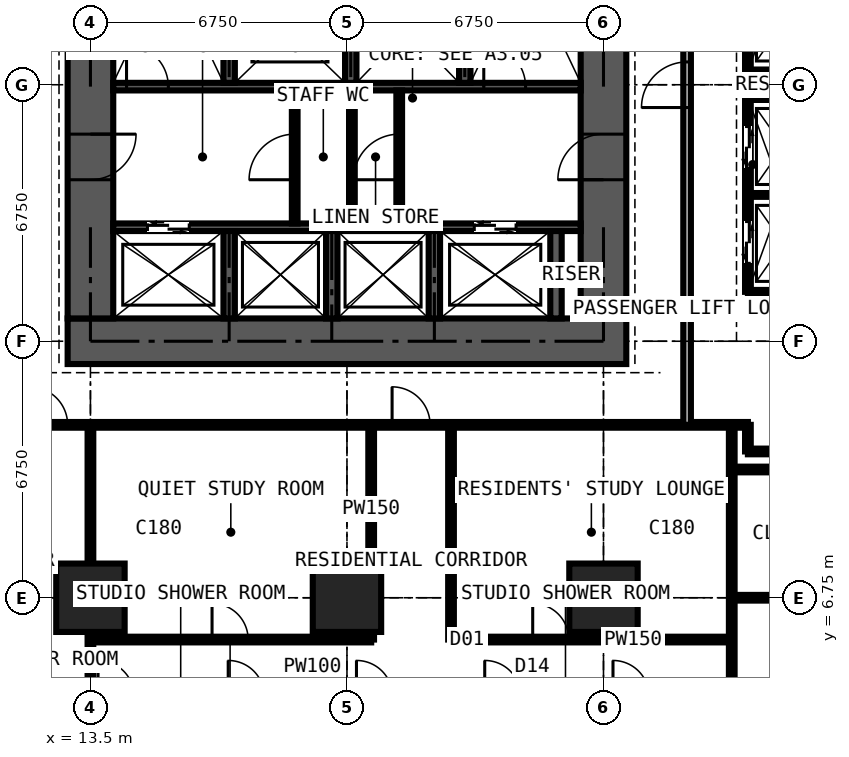
"""IFC4 building model, lengths in metres.
Left out: names, types, materials, properties, quantities, classifications, styles, units other than length and angle.
Written with IfcOpenShell. Run it as: python <this file> out.ifc"""

import sys

from ifc_helpers import new_model, si_unit, direction, frame, frame_2d, origin, origin_2d, place, context, subcontext, project, spatial, rectangle, extrude, element, fill, save


model = new_model("IFC4")
c1 = context("Model", 3, precision=1e-05, world=origin(), true_north=direction((0.0, 1.0)))
c2 = subcontext(c1, "Body", "Model", "MODEL_VIEW")
j1 = project(units=[si_unit("LENGTHUNIT", "METRE"), si_unit("PLANEANGLEUNIT", "RADIAN")], contexts=[c1])
p1 = place(None, origin())
s1 = spatial("IfcSite", under=j1, at=p1, CompositionType="ELEMENT")
p2 = place(p1, origin())
s2 = spatial("IfcBuilding", under=s1, at=p2, CompositionType="ELEMENT")
p3 = place(p2, frame((0.0, 0.0, 105.3)))
s3 = spatial("IfcBuildingStorey", under=s2, at=p3, CompositionType="ELEMENT", Elevation=105.3)
for number, where, z_axis, x_axis in (
    (1, (13.5, 6.75, 0.0), (0.0, 0.0, 1.0), (1.0, 0.0, 0.0)),
    (2, (20.25, 6.75, 0.0), (0.0, 0.0, 1.0), (1.0, 0.0, 0.0)),
    (3, (27.0, 6.75, 0.0), (0.0, 0.0, 1.0), (1.0, 0.0, 0.0)),
):
    element("IfcColumn", number, at=place(p3, frame(where, z_axis=z_axis, x_axis=x_axis)), inside=s3, PredefinedType="COLUMN", context=c2, shape_type="SweptSolid", body=[
        extrude(rectangle(XDim=1.8, YDim=1.8, at=origin_2d()), origin(), (0.0, 0.0, 1.0), 3.6),
    ])
p4 = place(p3, frame((12.9, 13.5, 0.0), z_axis=(0.0, 0.0, 1.0), x_axis=(1.0, 0.0, 0.0)))
e4 = element("IfcWall", 4, at=p4, inside=s3, PredefinedType="SHEAR", context=c2, shape_type="SweptSolid", body=[
    extrude(rectangle(XDim=14.7, YDim=1.2, at=frame_2d((7.35, 0.0))), origin(), (0.0, 0.0, 1.0), 3.6),
])
p5 = place(p3, frame((27.0, 14.1, 0.0), z_axis=(0.0, 0.0, 1.0), x_axis=(0.0, 1.0, 0.0)))
e5 = element("IfcWall", 5, at=p5, inside=s3, PredefinedType="SHEAR", context=c2, shape_type="SweptSolid", body=[
    extrude(rectangle(XDim=12.3, YDim=1.2, at=frame_2d((6.15, 0.0))), origin(), (0.0, 0.0, 1.0), 3.6),
])
p6 = place(p5, frame((3.65, 0.0, 0.0)))
e6 = element("IfcOpeningElement", 6, at=p6, cuts=e5, PredefinedType="OPENING", context=c2, shape_type="SweptSolid", body=[
    extrude(rectangle(XDim=1.2, YDim=2.2, at=frame_2d((0.6, 1.1))), frame((0.0, 0.61, 0.0), z_axis=(0.0, -1.0, 0.0), x_axis=(1.0, 0.0, 0.0)), (0.0, 0.0, 1.0), 1.22),
])
p7 = place(p3, frame((13.5, 26.4, 0.0), z_axis=(0.0, 0.0, 1.0), x_axis=(0.0, -1.0, 0.0)))
e7 = element("IfcWall", 7, at=p7, inside=s3, PredefinedType="SHEAR", context=c2, shape_type="SweptSolid", body=[
    extrude(rectangle(XDim=12.3, YDim=1.2, at=frame_2d((6.15, 0.0))), origin(), (0.0, 0.0, 1.0), 3.6),
])
p8 = place(p7, frame((7.45, 0.0, 0.0)))
e8 = element("IfcOpeningElement", 8, at=p8, cuts=e7, PredefinedType="OPENING", context=c2, shape_type="SweptSolid", body=[
    extrude(rectangle(XDim=1.2, YDim=2.2, at=frame_2d((0.6, 1.1))), frame((0.0, 0.61, 0.0), z_axis=(0.0, -1.0, 0.0), x_axis=(1.0, 0.0, 0.0)), (0.0, 0.0, 1.0), 1.22),
])
p9 = place(p3, frame((14.1, 16.5, 0.0), z_axis=(0.0, 0.0, 1.0), x_axis=(1.0, 0.0, 0.0)))
e9 = element("IfcWall", 9, at=p9, inside=s3, PredefinedType="SHEAR", context=c2, shape_type="SweptSolid", body=[
    extrude(rectangle(XDim=12.3, YDim=0.2, at=frame_2d((6.15, 0.0))), origin(), (0.0, 0.0, 1.0), 3.6),
])
p10 = place(p9, frame((0.9, 0.0, 0.0)))
e10 = element("IfcOpeningElement", 10, at=p10, cuts=e9, PredefinedType="OPENING", context=c2, shape_type="SweptSolid", body=[
    extrude(rectangle(XDim=1.1, YDim=2.2, at=frame_2d((0.55, 1.1))), frame((0.0, 0.11, 0.0), z_axis=(0.0, -1.0, 0.0), x_axis=(1.0, 0.0, 0.0)), (0.0, 0.0, 1.0), 0.22),
])
p11 = place(p9, frame((9.5, 0.0, 0.0)))
e11 = element("IfcOpeningElement", 11, at=p11, cuts=e9, PredefinedType="OPENING", context=c2, shape_type="SweptSolid", body=[
    extrude(rectangle(XDim=1.1, YDim=2.2, at=frame_2d((0.55, 1.1))), frame((0.0, 0.11, 0.0), z_axis=(0.0, -1.0, 0.0), x_axis=(1.0, 0.0, 0.0)), (0.0, 0.0, 1.0), 0.22),
])
p12 = place(p3, frame((14.1, 20.2, 0.0), z_axis=(0.0, 0.0, 1.0), x_axis=(1.0, 0.0, 0.0)))
e12 = element("IfcWall", 12, at=p12, inside=s3, PredefinedType="SHEAR", context=c2, shape_type="SweptSolid", body=[
    extrude(rectangle(XDim=12.3, YDim=0.2, at=frame_2d((6.15, 0.0))), origin(), (0.0, 0.0, 1.0), 3.6),
])
p13 = place(p12, frame((0.35, 0.0, 0.0)))
e13 = element("IfcOpeningElement", 13, at=p13, cuts=e12, PredefinedType="OPENING", context=c2, shape_type="SweptSolid", body=[
    extrude(rectangle(XDim=1.1, YDim=2.2, at=frame_2d((0.55, 1.1))), frame((0.0, 0.11, 0.0), z_axis=(0.0, -1.0, 0.0), x_axis=(1.0, 0.0, 0.0)), (0.0, 0.0, 1.0), 0.22),
])
p14 = place(p12, frame((9.75, 0.0, 0.0)))
e14 = element("IfcOpeningElement", 14, at=p14, cuts=e12, PredefinedType="OPENING", context=c2, shape_type="SweptSolid", body=[
    extrude(rectangle(XDim=1.1, YDim=2.2, at=frame_2d((0.55, 1.1))), frame((0.0, 0.11, 0.0), z_axis=(0.0, -1.0, 0.0), x_axis=(1.0, 0.0, 0.0)), (0.0, 0.0, 1.0), 0.22),
])
for number, where, z_axis, x_axis in (
    (15, (17.15, 20.3, 0.0), (0.0, 0.0, 1.0), (0.0, 1.0, 0.0)),
    (16, (23.35, 20.3, 0.0), (0.0, 0.0, 1.0), (0.0, 1.0, 0.0)),
):
    element("IfcWall", number, at=place(p3, frame(where, z_axis=z_axis, x_axis=x_axis)), inside=s3, PredefinedType="SHEAR", context=c2, shape_type="SweptSolid", body=[
        extrude(rectangle(XDim=6.1, YDim=0.3, at=frame_2d((3.05, 0.0))), origin(), (0.0, 0.0, 1.0), 3.6),
    ])
p15 = place(p3, frame((20.35, 20.3, 0.0), z_axis=(0.0, 0.0, 1.0), x_axis=(0.0, 1.0, 0.0)))
e17 = element("IfcWall", 17, at=p15, inside=s3, PredefinedType="SHEAR", context=c2, shape_type="SweptSolid", body=[
    extrude(rectangle(XDim=2.8, YDim=0.3, at=frame_2d((1.4, 0.0))), origin(), (0.0, 0.0, 1.0), 3.6),
])
for number, where, z_axis, x_axis in (
    (18, (17.15, 14.1, 0.0), (0.0, 0.0, 1.0), (0.0, 1.0, 0.0)),
    (19, (19.85, 14.1, 0.0), (0.0, 0.0, 1.0), (0.0, 1.0, 0.0)),
    (20, (22.55, 14.1, 0.0), (0.0, 0.0, 1.0), (0.0, 1.0, 0.0)),
    (21, (25.75, 14.1, 0.0), (0.0, 0.0, 1.0), (0.0, 1.0, 0.0)),
):
    element("IfcWall", number, at=place(p3, frame(where, z_axis=z_axis, x_axis=x_axis)), inside=s3, PredefinedType="SHEAR", context=c2, shape_type="SweptSolid", body=[
        extrude(rectangle(XDim=2.3, YDim=0.3, at=frame_2d((1.15, 0.0))), origin(), (0.0, 0.0, 1.0), 3.6),
    ])
p16 = place(p3, frame((18.875, 16.6, 0.0), z_axis=(0.0, 0.0, 1.0), x_axis=(0.0, 1.0, 0.0)))
e22 = element("IfcWall", 22, at=p16, inside=s3, PredefinedType="PARTITIONING", context=c2, shape_type="SweptSolid", body=[
    extrude(rectangle(XDim=3.5, YDim=0.15, at=frame_2d((1.75, 0.0))), origin(), (0.0, 0.0, 1.0), 3.375),
])
p17 = place(p16, frame((1.15, 0.0, 0.0)))
e23 = element("IfcOpeningElement", 23, at=p17, cuts=e22, PredefinedType="OPENING", context=c2, shape_type="SweptSolid", body=[
    extrude(rectangle(XDim=1.2, YDim=2.2, at=frame_2d((0.6, 1.1))), frame((0.0, 0.085, 0.0), z_axis=(0.0, -1.0, 0.0), x_axis=(1.0, 0.0, 0.0)), (0.0, 0.0, 1.0), 0.17),
])
p18 = place(p3, frame((21.625, 16.6, 0.0), z_axis=(0.0, 0.0, 1.0), x_axis=(0.0, 1.0, 0.0)))
e24 = element("IfcWall", 24, at=p18, inside=s3, PredefinedType="PARTITIONING", context=c2, shape_type="SweptSolid", body=[
    extrude(rectangle(XDim=3.5, YDim=0.15, at=frame_2d((1.75, 0.0))), origin(), (0.0, 0.0, 1.0), 3.375),
])
p19 = place(p18, frame((1.15, 0.0, 0.0)))
e25 = element("IfcOpeningElement", 25, at=p19, cuts=e24, PredefinedType="OPENING", context=c2, shape_type="SweptSolid", body=[
    extrude(rectangle(XDim=1.2, YDim=2.2, at=frame_2d((0.6, 1.1))), frame((0.0, 0.085, 0.0), z_axis=(0.0, -1.0, 0.0), x_axis=(1.0, 0.0, 0.0)), (0.0, 0.0, 1.0), 0.17),
])
p20 = place(p3, frame((20.38, 16.6, 0.0), z_axis=(0.0, 0.0, 1.0), x_axis=(0.0, 1.0, 0.0)))
e26 = element("IfcWall", 26, at=p20, inside=s3, PredefinedType="PARTITIONING", context=c2, shape_type="SweptSolid", body=[
    extrude(rectangle(XDim=3.5, YDim=0.15, at=frame_2d((1.75, 0.0))), origin(), (0.0, 0.0, 1.0), 3.375),
])
p21 = place(p3, frame((10.125, 11.3, 0.0), z_axis=(0.0, 0.0, 1.0), x_axis=(1.0, 0.0, 0.0)))
e27 = element("IfcWall", 27, at=p21, inside=s3, PredefinedType="PARTITIONING", context=c2, shape_type="SweptSolid", body=[
    extrude(rectangle(XDim=20.675, YDim=0.15, at=frame_2d((10.337, 0.0))), origin(), (0.0, 0.0, 1.0), 3.375),
])
p22 = place(p21, frame((1.775, 0.0, 0.0)))
e28 = element("IfcOpeningElement", 28, at=p22, cuts=e27, PredefinedType="OPENING", context=c2, shape_type="SweptSolid", body=[
    extrude(rectangle(XDim=1.0, YDim=2.2, at=frame_2d((0.5, 1.1))), frame((0.0, 0.085, 0.0), z_axis=(0.0, -1.0, 0.0), x_axis=(1.0, 0.0, 0.0)), (0.0, 0.0, 1.0), 0.17),
])
p23 = place(p21, frame((11.312, 0.0, 0.0)))
e29 = element("IfcOpeningElement", 29, at=p23, cuts=e27, PredefinedType="OPENING", context=c2, shape_type="SweptSolid", body=[
    extrude(rectangle(XDim=1.0, YDim=2.2, at=frame_2d((0.5, 1.1))), frame((0.0, 0.085, 0.0), z_axis=(0.0, -1.0, 0.0), x_axis=(1.0, 0.0, 0.0)), (0.0, 0.0, 1.0), 0.17),
])
p24 = place(p3, frame((13.5, -0.734, 0.0), z_axis=(0.0, 0.0, 1.0), x_axis=(0.0, 1.0, 0.0)))
e30 = element("IfcWall", 30, at=p24, inside=s3, PredefinedType="PARTITIONING", context=c2, shape_type="SweptSolid", body=[
    extrude(rectangle(XDim=12.034, YDim=0.15, at=frame_2d((6.017, 0.0))), origin(), (0.0, 0.0, 1.0), 2.61),
])
p25 = place(p3, frame((13.5, 5.65, 0.0), z_axis=(0.0, 0.0, 1.0), x_axis=(1.0, 0.0, 0.0)))
e31 = element("IfcWall", 31, at=p25, inside=s3, PredefinedType="PARTITIONING", context=c2, shape_type="SweptSolid", body=[
    extrude(rectangle(XDim=7.387, YDim=0.15, at=frame_2d((3.694, 0.0))), origin(), (0.0, 0.0, 1.0), 3.375),
])
p26 = place(p25, frame((3.2, 0.0, 0.0)))
e32 = element("IfcOpeningElement", 32, at=p26, cuts=e31, PredefinedType="OPENING", context=c2, shape_type="SweptSolid", body=[
    extrude(rectangle(XDim=0.95, YDim=2.2, at=frame_2d((0.475, 1.1))), frame((0.0, 0.085, 0.0), z_axis=(0.0, -1.0, 0.0), x_axis=(1.0, 0.0, 0.0)), (0.0, 0.0, 1.0), 0.17),
])
p27 = place(p3, frame((20.887, 5.65, 0.0), z_axis=(0.0, 0.0, 1.0), x_axis=(0.0, 1.0, 0.0)))
e33 = element("IfcWall", 33, at=p27, inside=s3, PredefinedType="PARTITIONING", context=c2, shape_type="SweptSolid", body=[
    extrude(rectangle(XDim=5.65, YDim=0.15, at=frame_2d((2.825, 0.0))), origin(), (0.0, 0.0, 1.0), 3.375),
])
p28 = place(p3, frame((22.988, 5.65, 0.0), z_axis=(0.0, 0.0, 1.0), x_axis=(1.0, 0.0, 0.0)))
e34 = element("IfcWall", 34, at=p28, inside=s3, PredefinedType="PARTITIONING", context=c2, shape_type="SweptSolid", body=[
    extrude(rectangle(XDim=7.387, YDim=0.15, at=frame_2d((3.694, 0.0))), origin(), (0.0, 0.0, 1.0), 3.375),
])
p29 = place(p28, frame((2.15, 0.0, 0.0)))
e35 = element("IfcOpeningElement", 35, at=p29, cuts=e34, PredefinedType="OPENING", context=c2, shape_type="SweptSolid", body=[
    extrude(rectangle(XDim=0.95, YDim=2.2, at=frame_2d((0.475, 1.1))), frame((0.0, 0.085, 0.0), z_axis=(0.0, -1.0, 0.0), x_axis=(1.0, 0.0, 0.0)), (0.0, 0.0, 1.0), 0.17),
])
p30 = place(p3, frame((22.988, 5.65, 0.0), z_axis=(0.0, 0.0, 1.0), x_axis=(0.0, 1.0, 0.0)))
e36 = element("IfcWall", 36, at=p30, inside=s3, PredefinedType="PARTITIONING", context=c2, shape_type="SweptSolid", body=[
    extrude(rectangle(XDim=5.65, YDim=0.15, at=frame_2d((2.825, 0.0))), origin(), (0.0, 0.0, 1.0), 3.375),
])
p31 = place(p3, frame((29.2, 11.3, 0.0), z_axis=(0.0, 0.0, 1.0), x_axis=(0.0, 1.0, 0.0)))
e37 = element("IfcWall", 37, at=p31, inside=s3, PredefinedType="PARTITIONING", context=c2, shape_type="SweptSolid", body=[
    extrude(rectangle(XDim=17.9, YDim=0.2, at=frame_2d((8.95, 0.0))), origin(), (0.0, 0.0, 1.0), 3.375),
])
p32 = place(p31, frame((8.35, 0.0, 0.0)))
e38 = element("IfcOpeningElement", 38, at=p32, cuts=e37, PredefinedType="OPENING", context=c2, shape_type="SweptSolid", body=[
    extrude(rectangle(XDim=1.2, YDim=2.2, at=frame_2d((0.6, 1.1))), frame((0.0, 0.11, 0.0), z_axis=(0.0, -1.0, 0.0), x_axis=(1.0, 0.0, 0.0)), (0.0, 0.0, 1.0), 0.22),
])
p33 = place(p3, frame((30.375, -0.734, 0.0), z_axis=(0.0, 0.0, 1.0), x_axis=(0.0, 1.0, 0.0)))
e39 = element("IfcWall", 39, at=p33, inside=s3, PredefinedType="PARTITIONING", context=c2, shape_type="SweptSolid", body=[
    extrude(rectangle(XDim=12.034, YDim=0.15, at=frame_2d((6.017, 0.0))), origin(), (0.0, 0.0, 1.0), 3.375),
])
p34 = place(p3, frame((30.375, 6.75, 0.0), z_axis=(0.0, 0.0, 1.0), x_axis=(1.0, 0.0, 0.0)))
e40 = element("IfcWall", 40, at=p34, inside=s3, PredefinedType="PARTITIONING", context=c2, shape_type="SweptSolid", body=[
    extrude(rectangle(XDim=10.859, YDim=0.15, at=frame_2d((5.429, 0.0))), origin(), (0.0, 0.0, 1.0), 2.877),
])
p35 = place(p34, frame((1.45, 0.0, 0.0)))
e41 = element("IfcOpeningElement", 41, at=p35, cuts=e40, PredefinedType="OPENING", context=c2, shape_type="SweptSolid", body=[
    extrude(rectangle(XDim=1.0, YDim=2.2, at=frame_2d((0.5, 1.1))), frame((0.0, 0.085, 0.0), z_axis=(0.0, -1.0, 0.0), x_axis=(1.0, 0.0, 0.0)), (0.0, 0.0, 1.0), 0.17),
])
p36 = place(p3, frame((30.375, 10.125, 0.0), z_axis=(0.0, 0.0, 1.0), x_axis=(1.0, 0.0, 0.0)))
e42 = element("IfcWall", 42, at=p36, inside=s3, PredefinedType="PARTITIONING", context=c2, shape_type="SweptSolid", body=[
    extrude(rectangle(XDim=10.859, YDim=0.15, at=frame_2d((5.429, 0.0))), origin(), (0.0, 0.0, 1.0), 3.375),
])
p37 = place(p36, frame((2.5, 0.0, 0.0)))
e43 = element("IfcOpeningElement", 43, at=p37, cuts=e42, PredefinedType="OPENING", context=c2, shape_type="SweptSolid", body=[
    extrude(rectangle(XDim=1.0, YDim=2.2, at=frame_2d((0.5, 1.1))), frame((0.0, 0.085, 0.0), z_axis=(0.0, -1.0, 0.0), x_axis=(1.0, 0.0, 0.0)), (0.0, 0.0, 1.0), 0.17),
])
p38 = place(p3, frame((30.8, 10.6, 0.0), z_axis=(0.0, 0.0, 1.0), x_axis=(0.0, 1.0, 0.0)))
e44 = element("IfcWall", 44, at=p38, inside=s3, PredefinedType="PARTITIONING", context=c2, shape_type="SweptSolid", body=[
    extrude(rectangle(XDim=0.7, YDim=0.15, at=frame_2d((0.35, 0.0))), origin(), (0.0, 0.0, 1.0), 3.375),
])
p39 = place(p3, frame((30.8, 10.6, 0.0), z_axis=(0.0, 0.0, 1.0), x_axis=(1.0, 0.0, 0.0)))
e45 = element("IfcWall", 45, at=p39, inside=s3, PredefinedType="PARTITIONING", context=c2, shape_type="SweptSolid", body=[
    extrude(rectangle(XDim=1.85, YDim=0.15, at=frame_2d((0.925, 0.0))), origin(), (0.0, 0.0, 1.0), 3.375),
])
p40 = place(p3, frame((30.8, 14.8, 0.0), z_axis=(0.0, 0.0, 1.0), x_axis=(0.0, 1.0, 0.0)))
e46 = element("IfcWall", 46, at=p40, inside=s3, PredefinedType="PARTITIONING", context=c2, shape_type="SweptSolid", body=[
    extrude(rectangle(XDim=10.9, YDim=0.15, at=frame_2d((5.45, 0.0))), origin(), (0.0, 0.0, 1.0), 3.375),
])
p41 = place(p40, frame((0.75, 0.0, 0.0)))
e47 = element("IfcOpeningElement", 47, at=p41, cuts=e46, PredefinedType="OPENING", context=c2, shape_type="SweptSolid", body=[
    extrude(rectangle(XDim=1.1, YDim=2.2, at=frame_2d((0.55, 1.1))), frame((0.0, 0.085, 0.0), z_axis=(0.0, -1.0, 0.0), x_axis=(1.0, 0.0, 0.0)), (0.0, 0.0, 1.0), 0.17),
])
p42 = place(p40, frame((3.25, 0.0, 0.0)))
e48 = element("IfcOpeningElement", 48, at=p42, cuts=e46, PredefinedType="OPENING", context=c2, shape_type="SweptSolid", body=[
    extrude(rectangle(XDim=1.1, YDim=2.2, at=frame_2d((0.55, 1.1))), frame((0.0, 0.085, 0.0), z_axis=(0.0, -1.0, 0.0), x_axis=(1.0, 0.0, 0.0)), (0.0, 0.0, 1.0), 0.17),
])
p43 = place(p40, frame((6.5, 0.0, 0.0)))
e49 = element("IfcOpeningElement", 49, at=p43, cuts=e46, PredefinedType="OPENING", context=c2, shape_type="SweptSolid", body=[
    extrude(rectangle(XDim=1.1, YDim=2.2, at=frame_2d((0.55, 1.1))), frame((0.0, 0.085, 0.0), z_axis=(0.0, -1.0, 0.0), x_axis=(1.0, 0.0, 0.0)), (0.0, 0.0, 1.0), 0.17),
])
p44 = place(p40, frame((9.05, 0.0, 0.0)))
e50 = element("IfcOpeningElement", 50, at=p44, cuts=e46, PredefinedType="OPENING", context=c2, shape_type="SweptSolid", body=[
    extrude(rectangle(XDim=1.1, YDim=2.2, at=frame_2d((0.55, 1.1))), frame((0.0, 0.085, 0.0), z_axis=(0.0, -1.0, 0.0), x_axis=(1.0, 0.0, 0.0)), (0.0, 0.0, 1.0), 0.17),
])
for number, where, z_axis, x_axis in (
    (51, (30.8, 14.8, 0.0), (0.0, 0.0, 1.0), (1.0, 0.0, 0.0)),
    (52, (30.8, 17.35, 0.0), (0.0, 0.0, 1.0), (1.0, 0.0, 0.0)),
    (53, (30.8, 19.9, 0.0), (0.0, 0.0, 1.0), (1.0, 0.0, 0.0)),
    (54, (30.8, 20.6, 0.0), (0.0, 0.0, 1.0), (1.0, 0.0, 0.0)),
):
    element("IfcWall", number, at=place(p3, frame(where, z_axis=z_axis, x_axis=x_axis)), inside=s3, PredefinedType="SHEAR", context=c2, shape_type="SweptSolid", body=[
        extrude(rectangle(XDim=1.85, YDim=0.1, at=frame_2d((0.925, 0.0))), origin(), (0.0, 0.0, 1.0), 3.375),
    ])
p45 = place(p10, origin())
e55 = element("IfcDoor", 55, at=p45, inside=s3, OperationType="DOUBLE_DOOR_SLIDING", PredefinedType="DOOR", context=c2, shape_type="SweptSolid", body=[
    extrude(rectangle(XDim=1.1, YDim=2.2, at=frame_2d((0.55, 1.1))), frame((0.0, 0.025, 0.0), z_axis=(0.0, -1.0, 0.0), x_axis=(1.0, 0.0, 0.0)), (0.0, 0.0, 1.0), 0.05),
])
fill(e10, e55)
p46 = place(p11, origin())
e56 = element("IfcDoor", 56, at=p46, inside=s3, OperationType="DOUBLE_DOOR_SLIDING", PredefinedType="DOOR", context=c2, shape_type="SweptSolid", body=[
    extrude(rectangle(XDim=1.1, YDim=2.2, at=frame_2d((0.55, 1.1))), frame((0.0, 0.025, 0.0), z_axis=(0.0, -1.0, 0.0), x_axis=(1.0, 0.0, 0.0)), (0.0, 0.0, 1.0), 0.05),
])
fill(e11, e56)
p47 = place(p8, origin())
e57 = element("IfcDoor", 57, at=p47, inside=s3, OperationType="DOUBLE_DOOR_SINGLE_SWING", PredefinedType="DOOR", context=c2, shape_type="SweptSolid", body=[
    extrude(rectangle(XDim=1.2, YDim=2.2, at=frame_2d((0.6, 1.1))), frame((0.0, 0.025, 0.0), z_axis=(0.0, -1.0, 0.0), x_axis=(1.0, 0.0, 0.0)), (0.0, 0.0, 1.0), 0.05),
])
fill(e8, e57)
p48 = place(p6, origin())
e58 = element("IfcDoor", 58, at=p48, inside=s3, OperationType="DOUBLE_DOOR_SINGLE_SWING", PredefinedType="DOOR", context=c2, shape_type="SweptSolid", body=[
    extrude(rectangle(XDim=1.2, YDim=2.2, at=frame_2d((0.6, 1.1))), frame((0.0, 0.025, 0.0), z_axis=(0.0, -1.0, 0.0), x_axis=(1.0, 0.0, 0.0)), (0.0, 0.0, 1.0), 0.05),
])
fill(e6, e58)
p49 = place(p17, origin())
e59 = element("IfcDoor", 59, at=p49, inside=s3, OperationType="DOUBLE_DOOR_SINGLE_SWING", PredefinedType="DOOR", context=c2, shape_type="SweptSolid", body=[
    extrude(rectangle(XDim=1.2, YDim=2.2, at=frame_2d((0.6, 1.1))), frame((0.0, 0.025, 0.0), z_axis=(0.0, -1.0, 0.0), x_axis=(1.0, 0.0, 0.0)), (0.0, 0.0, 1.0), 0.05),
])
fill(e23, e59)
p50 = place(p19, origin())
e60 = element("IfcDoor", 60, at=p50, inside=s3, OperationType="DOUBLE_DOOR_SINGLE_SWING", PredefinedType="DOOR", context=c2, shape_type="SweptSolid", body=[
    extrude(rectangle(XDim=1.2, YDim=2.2, at=frame_2d((0.6, 1.1))), frame((0.0, 0.025, 0.0), z_axis=(0.0, -1.0, 0.0), x_axis=(1.0, 0.0, 0.0)), (0.0, 0.0, 1.0), 0.05),
])
fill(e25, e60)
p51 = place(p13, origin())
e61 = element("IfcDoor", 61, at=p51, inside=s3, OperationType="SINGLE_SWING_LEFT", PredefinedType="DOOR", context=c2, shape_type="SweptSolid", body=[
    extrude(rectangle(XDim=1.1, YDim=2.2, at=frame_2d((0.55, 1.1))), frame((0.0, 0.025, 0.0), z_axis=(0.0, -1.0, 0.0), x_axis=(1.0, 0.0, 0.0)), (0.0, 0.0, 1.0), 0.05),
])
fill(e13, e61)
p52 = place(p14, origin())
e62 = element("IfcDoor", 62, at=p52, inside=s3, OperationType="SINGLE_SWING_LEFT", PredefinedType="DOOR", context=c2, shape_type="SweptSolid", body=[
    extrude(rectangle(XDim=1.1, YDim=2.2, at=frame_2d((0.55, 1.1))), frame((0.0, 0.025, 0.0), z_axis=(0.0, -1.0, 0.0), x_axis=(1.0, 0.0, 0.0)), (0.0, 0.0, 1.0), 0.05),
])
fill(e14, e62)
p53 = place(p22, origin())
e63 = element("IfcDoor", 63, at=p53, inside=s3, OperationType="SINGLE_SWING_LEFT", PredefinedType="DOOR", context=c2, shape_type="SweptSolid", body=[
    extrude(rectangle(XDim=1.0, YDim=2.2, at=frame_2d((0.5, 1.1))), frame((0.0, 0.025, 0.0), z_axis=(0.0, -1.0, 0.0), x_axis=(1.0, 0.0, 0.0)), (0.0, 0.0, 1.0), 0.05),
])
fill(e28, e63)
p54 = place(p23, origin())
e64 = element("IfcDoor", 64, at=p54, inside=s3, OperationType="SINGLE_SWING_LEFT", PredefinedType="DOOR", context=c2, shape_type="SweptSolid", body=[
    extrude(rectangle(XDim=1.0, YDim=2.2, at=frame_2d((0.5, 1.1))), frame((0.0, 0.025, 0.0), z_axis=(0.0, -1.0, 0.0), x_axis=(1.0, 0.0, 0.0)), (0.0, 0.0, 1.0), 0.05),
])
fill(e29, e64)
p55 = place(p29, origin())
e65 = element("IfcDoor", 65, at=p55, inside=s3, OperationType="SINGLE_SWING_LEFT", PredefinedType="DOOR", context=c2, shape_type="SweptSolid", body=[
    extrude(rectangle(XDim=0.95, YDim=2.2, at=frame_2d((0.475, 1.1))), frame((0.0, 0.025, 0.0), z_axis=(0.0, -1.0, 0.0), x_axis=(1.0, 0.0, 0.0)), (0.0, 0.0, 1.0), 0.05),
])
fill(e35, e65)
p56 = place(p26, origin())
e66 = element("IfcDoor", 66, at=p56, inside=s3, OperationType="SINGLE_SWING_LEFT", PredefinedType="DOOR", context=c2, shape_type="SweptSolid", body=[
    extrude(rectangle(XDim=0.95, YDim=2.2, at=frame_2d((0.475, 1.1))), frame((0.0, 0.025, 0.0), z_axis=(0.0, -1.0, 0.0), x_axis=(1.0, 0.0, 0.0)), (0.0, 0.0, 1.0), 0.05),
])
fill(e32, e66)
p57 = place(p41, origin())
e67 = element("IfcDoor", 67, at=p57, inside=s3, OperationType="DOUBLE_DOOR_SLIDING", PredefinedType="DOOR", context=c2, shape_type="SweptSolid", body=[
    extrude(rectangle(XDim=1.1, YDim=2.2, at=frame_2d((0.55, 1.1))), frame((0.0, 0.025, 0.0), z_axis=(0.0, -1.0, 0.0), x_axis=(1.0, 0.0, 0.0)), (0.0, 0.0, 1.0), 0.05),
])
fill(e47, e67)
p58 = place(p42, origin())
e68 = element("IfcDoor", 68, at=p58, inside=s3, OperationType="DOUBLE_DOOR_SLIDING", PredefinedType="DOOR", context=c2, shape_type="SweptSolid", body=[
    extrude(rectangle(XDim=1.1, YDim=2.2, at=frame_2d((0.55, 1.1))), frame((0.0, 0.025, 0.0), z_axis=(0.0, -1.0, 0.0), x_axis=(1.0, 0.0, 0.0)), (0.0, 0.0, 1.0), 0.05),
])
fill(e48, e68)
p59 = place(p32, origin())
e69 = element("IfcDoor", 69, at=p59, inside=s3, OperationType="DOUBLE_DOOR_SINGLE_SWING", PredefinedType="DOOR", context=c2, shape_type="SweptSolid", body=[
    extrude(rectangle(XDim=1.2, YDim=2.2, at=frame_2d((0.6, 1.1))), frame((0.0, 0.025, 0.0), z_axis=(0.0, -1.0, 0.0), x_axis=(1.0, 0.0, 0.0)), (0.0, 0.0, 1.0), 0.05),
])
fill(e38, e69)
save(model, sys.argv[1])
